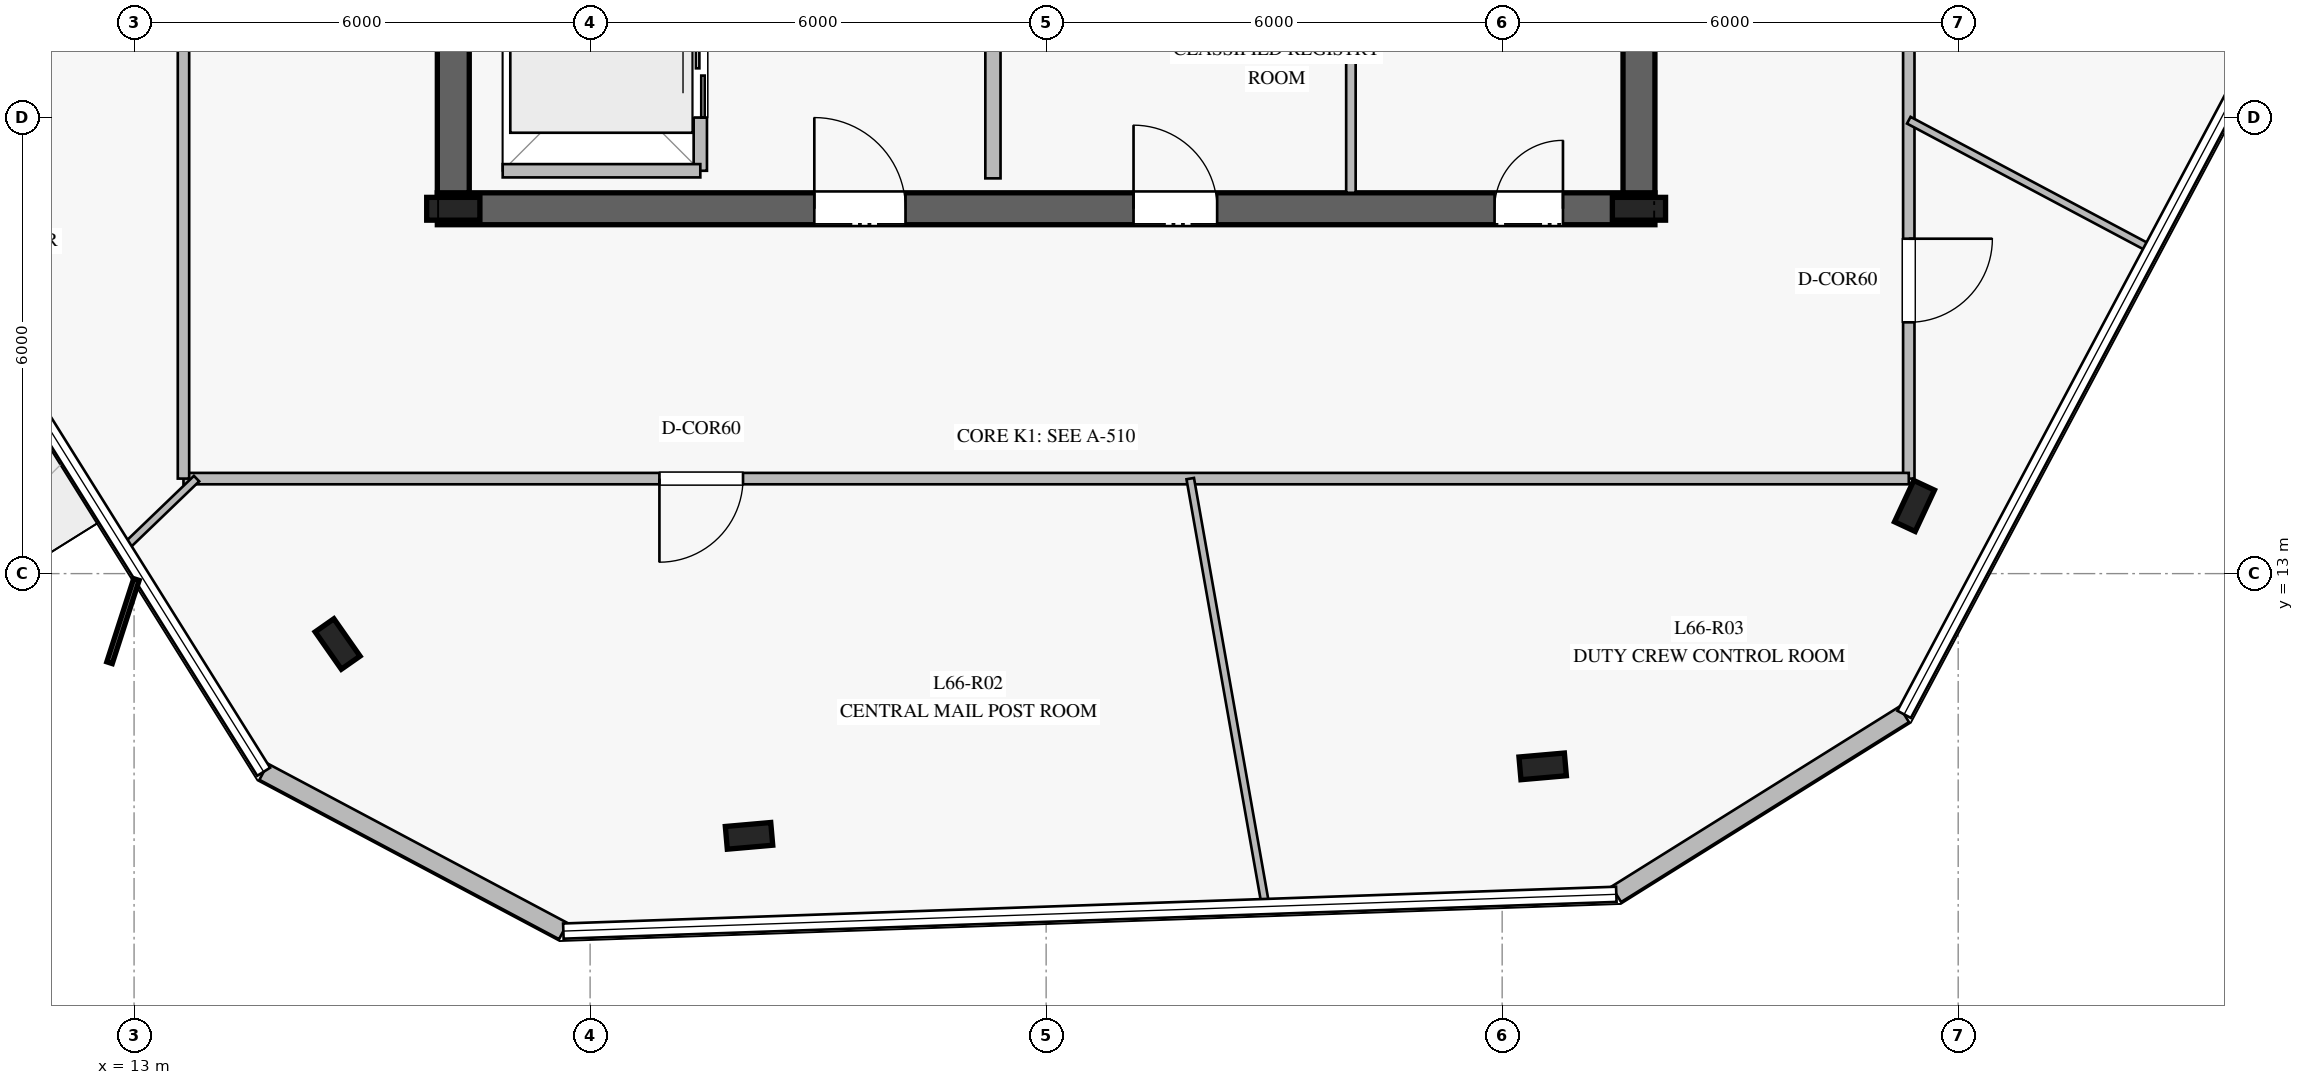
"""IFC4 building model, lengths in metres.
Left out: names, types, materials, properties, quantities, classifications, styles, units other than length and angle.
Written with IfcOpenShell. Run it as: python <this file> out.ifc"""

import sys

from ifc_helpers import new_model, si_unit, direction, frame, frame_2d, origin, origin_2d, place, context, subcontext, project, spatial, rectangle, i_section, extrude, element, fill, save


model = new_model("IFC4")
c1 = context("Model", 3, precision=1e-05, world=origin(), true_north=direction((0.0, 1.0)))
c2 = subcontext(c1, "Body", "Model", "MODEL_VIEW")
j1 = project(units=[si_unit("LENGTHUNIT", "METRE"), si_unit("PLANEANGLEUNIT", "RADIAN")], contexts=[c1])
p1 = place(None, origin())
s1 = spatial("IfcSite", under=j1, at=p1, CompositionType="ELEMENT")
p2 = place(p1, origin())
s2 = spatial("IfcBuilding", under=s1, at=p2, CompositionType="ELEMENT")
p3 = place(p2, frame((0.0, 0.0, 274.2)))
s3 = spatial("IfcBuildingStorey", under=s2, at=p3, CompositionType="ELEMENT", Elevation=274.2)
p4 = place(p3, frame((16.99, 17.8, 0.0), z_axis=(0.0, 0.0, 1.0), x_axis=(1.0, 0.0, 0.0)))
e1 = element("IfcWall", 1, at=p4, inside=s3, PredefinedType="SHEAR", context=c2, shape_type="SweptSolid", body=[
    extrude(rectangle(XDim=16.02, YDim=0.42, at=frame_2d((8.01, 0.0))), origin(), (0.0, 0.0, 1.0), 3.78),
])
p5 = place(p4, frame((4.96, 0.0, 0.0)))
e2 = element("IfcOpeningElement", 2, at=p5, cuts=e1, PredefinedType="OPENING", context=c2, shape_type="SweptSolid", body=[
    extrude(rectangle(XDim=1.2, YDim=2.25, at=frame_2d((0.6, 1.125))), frame((0.0, 0.22, 0.0), z_axis=(0.0, -1.0, 0.0), x_axis=(1.0, 0.0, 0.0)), (0.0, 0.0, 1.0), 0.44),
])
p6 = place(p4, frame((13.91, 0.0, 0.0)))
e3 = element("IfcOpeningElement", 3, at=p6, cuts=e1, PredefinedType="OPENING", context=c2, shape_type="SweptSolid", body=[
    extrude(rectangle(XDim=0.9, YDim=2.1, at=frame_2d((0.45, 1.05))), frame((0.0, 0.22, 0.0), z_axis=(0.0, -1.0, 0.0), x_axis=(1.0, 0.0, 0.0)), (0.0, 0.0, 1.0), 0.44),
])
p7 = place(p4, frame((9.16, 0.0, 0.0)))
e4 = element("IfcOpeningElement", 4, at=p7, cuts=e1, PredefinedType="OPENING", context=c2, shape_type="SweptSolid", body=[
    extrude(rectangle(XDim=1.1, YDim=2.2, at=frame_2d((0.55, 1.1))), frame((0.0, 0.22, 0.0), z_axis=(0.0, -1.0, 0.0), x_axis=(1.0, 0.0, 0.0)), (0.0, 0.0, 1.0), 0.44),
])
p8 = place(p3, frame((17.2, 31.99, 0.0), z_axis=(0.0, 0.0, 1.0), x_axis=(0.0, -1.0, 0.0)))
e5 = element("IfcWall", 5, at=p8, inside=s3, PredefinedType="SHEAR", context=c2, shape_type="SweptSolid", body=[
    extrude(rectangle(XDim=13.98, YDim=0.42, at=frame_2d((6.99, 0.0))), origin(), (0.0, 0.0, 1.0), 3.78),
])
p9 = place(p8, frame((2.14, 0.0, 0.0)))
e6 = element("IfcOpeningElement", 6, at=p9, cuts=e5, PredefinedType="OPENING", context=c2, shape_type="SweptSolid", body=[
    extrude(rectangle(XDim=1.5, YDim=2.2, at=frame_2d((0.75, 1.1))), frame((0.0, 0.22, 0.0), z_axis=(0.0, -1.0, 0.0), x_axis=(1.0, 0.0, 0.0)), (0.0, 0.0, 1.0), 0.44),
])
p10 = place(p3, frame((32.8, 18.01, 0.0), z_axis=(0.0, 0.0, 1.0), x_axis=(0.0, 1.0, 0.0)))
e7 = element("IfcWall", 7, at=p10, inside=s3, PredefinedType="SHEAR", context=c2, shape_type="SweptSolid", body=[
    extrude(rectangle(XDim=13.98, YDim=0.42, at=frame_2d((6.99, 0.0))), origin(), (0.0, 0.0, 1.0), 3.78),
])
for number, where, z_axis, x_axis in (
    (8, (17.2, 17.8, 0.0), (0.0, 0.0, 1.0), (1.0, 0.0, 0.0)),
    (9, (32.8, 17.8, 0.0), (0.0, 0.0, 1.0), (1.0, 0.0, 0.0)),
):
    element("IfcColumn", number, at=place(p3, frame(where, z_axis=z_axis, x_axis=x_axis)), inside=s3, PredefinedType="COLUMN", context=c2, shape_type="SweptSolid", body=[
        extrude(i_section(OverallWidth=0.3, OverallDepth=0.7, WebThickness=0.017, FlangeThickness=0.032, at=origin_2d()), origin(), (0.0, 0.0, 1.0), 4.0),
    ])
for number, where, z_axis, x_axis in (
    (10, (15.678, 12.074, 0.0), (0.0, 0.0, 1.0), (-0.574, 0.819, 0.0)),
    (11, (21.091, 9.55, 0.0), (0.0, 0.0, 1.0), (0.996, 0.087, 0.0)),
    (12, (31.533, 10.464, 0.0), (0.0, 0.0, 1.0), (0.996, 0.087, 0.0)),
    (13, (36.425, 13.89, 0.0), (0.0, 0.0, 1.0), (0.423, 0.906, 0.0)),
):
    element("IfcColumn", number, at=place(p3, frame(where, z_axis=z_axis, x_axis=x_axis)), inside=s3, PredefinedType="COLUMN", context=c2, shape_type="SweptSolid", body=[
        extrude(i_section(OverallWidth=0.3, OverallDepth=0.6, WebThickness=0.015, FlangeThickness=0.03, at=origin_2d()), origin(), (0.0, 0.0, 1.0), 4.0),
    ])
p11 = place(p3, frame((14.705, 10.393, 0.0), z_axis=(0.0, 0.0, 1.0), x_axis=(0.882995347911, -0.469381737574, 0.0)))
e14 = element("IfcWall", 14, at=p11, inside=s3, PredefinedType="STANDARD", context=c2, shape_type="SweptSolid", body=[
    extrude(rectangle(XDim=4.465, YDim=0.24, at=frame_2d((2.233, 0.0))), origin(), (0.0, 0.0, 1.0), 3.78),
])
p12 = place(p3, frame((32.502, 8.781, 0.0), z_axis=(0.0, 0.0, 1.0), x_axis=(0.847998304005, 0.529998940003, 0.0)))
e15 = element("IfcWall", 15, at=p12, inside=s3, PredefinedType="STANDARD", context=c2, shape_type="SweptSolid", body=[
    extrude(rectangle(XDim=4.466, YDim=0.24, at=frame_2d((2.233, 0.0))), origin(), (0.0, 0.0, 1.0), 3.78),
])
p13 = place(p3, frame((24.3, 18.2, 0.0), z_axis=(0.0, 0.0, 1.0), x_axis=(0.0, 1.0, 0.0)))
e16 = element("IfcWall", 16, at=p13, inside=s3, PredefinedType="PARTITIONING", context=c2, shape_type="SweptSolid", body=[
    extrude(rectangle(XDim=5.15, YDim=0.2, at=frame_2d((2.575, 0.0))), origin(), (0.0, 0.0, 1.0), 3.78),
])
p14 = place(p3, frame((29.01, 18.01, 0.0), z_axis=(0.0, 0.0, 1.0), x_axis=(0.0, 1.0, 0.0)))
e17 = element("IfcWall", 17, at=p14, inside=s3, PredefinedType="PARTITIONING", context=c2, shape_type="SweptSolid", body=[
    extrude(rectangle(XDim=2.54, YDim=0.125, at=frame_2d((1.27, 0.0))), origin(), (0.0, 0.0, 1.0), 3.78),
])
p15 = place(p3, frame((20.45, 18.3, 0.0), z_axis=(0.0, 0.0, 1.0), x_axis=(0.0, 1.0, 0.0)))
e18 = element("IfcWall", 18, at=p15, inside=s3, PredefinedType="PARTITIONING", context=c2, shape_type="SweptSolid", body=[
    extrude(rectangle(XDim=2.6, YDim=0.175, at=frame_2d((1.3, 0.0))), origin(), (0.0, 0.0, 1.0), 3.78),
])
p16 = place(p15, frame((0.7, 0.0, 0.0)))
e19 = element("IfcOpeningElement", 19, at=p16, cuts=e18, PredefinedType="OPENING", context=c2, shape_type="SweptSolid", body=[
    extrude(rectangle(XDim=1.2, YDim=2.2, at=frame_2d((0.6, 1.1))), frame((0.0, 0.098, 0.0), z_axis=(0.0, -1.0, 0.0), x_axis=(1.0, 0.0, 0.0)), (0.0, 0.0, 1.0), 0.195),
])
p17 = place(p3, frame((17.85, 18.3, 0.0), z_axis=(0.0, 0.0, 1.0), x_axis=(1.0, 0.0, 0.0)))
e20 = element("IfcWall", 20, at=p17, inside=s3, PredefinedType="PARTITIONING", context=c2, shape_type="SweptSolid", body=[
    extrude(rectangle(XDim=2.6, YDim=0.175, at=frame_2d((1.3, 0.0))), origin(), (0.0, 0.0, 1.0), 3.78),
])
p18 = place(p3, frame((36.35, 35.75, 0.0), z_axis=(0.0, 0.0, 1.0), x_axis=(0.0, -1.0, 0.0)))
e21 = element("IfcWall", 21, at=p18, inside=s3, PredefinedType="PARTITIONING", context=c2, shape_type="SweptSolid", body=[
    extrude(rectangle(XDim=21.5, YDim=0.15, at=frame_2d((10.75, 0.0))), origin(), (0.0, 0.0, 1.0), 3.28),
])
p19 = place(p18, frame((18.344, 0.0, 0.0)))
e22 = element("IfcOpeningElement", 22, at=p19, cuts=e21, PredefinedType="OPENING", context=c2, shape_type="SweptSolid", body=[
    extrude(rectangle(XDim=1.1, YDim=2.2, at=frame_2d((0.55, 1.1))), frame((0.0, 0.085, 0.0), z_axis=(0.0, -1.0, 0.0), x_axis=(1.0, 0.0, 0.0)), (0.0, 0.0, 1.0), 0.17),
])
p20 = place(p18, frame((10.606, 0.0, 0.0)))
e23 = element("IfcOpeningElement", 23, at=p20, cuts=e21, PredefinedType="OPENING", context=c2, shape_type="SweptSolid", body=[
    extrude(rectangle(XDim=1.1, YDim=2.2, at=frame_2d((0.55, 1.1))), frame((0.0, 0.085, 0.0), z_axis=(0.0, -1.0, 0.0), x_axis=(1.0, 0.0, 0.0)), (0.0, 0.0, 1.0), 0.17),
])
p21 = place(p3, frame((36.35, 14.25, 0.0), z_axis=(0.0, 0.0, 1.0), x_axis=(-1.0, 0.0, 0.0)))
e24 = element("IfcWall", 24, at=p21, inside=s3, PredefinedType="PARTITIONING", context=c2, shape_type="SweptSolid", body=[
    extrude(rectangle(XDim=22.7, YDim=0.15, at=frame_2d((11.35, 0.0))), origin(), (0.0, 0.0, 1.0), 3.05),
])
p22 = place(p21, frame((15.338, 0.0, 0.0)))
e25 = element("IfcOpeningElement", 25, at=p22, cuts=e24, PredefinedType="OPENING", context=c2, shape_type="SweptSolid", body=[
    extrude(rectangle(XDim=1.1, YDim=2.2, at=frame_2d((0.55, 1.1))), frame((0.0, 0.085, 0.0), z_axis=(0.0, -1.0, 0.0), x_axis=(1.0, 0.0, 0.0)), (0.0, 0.0, 1.0), 0.17),
])
p23 = place(p3, frame((13.65, 14.25, 0.0), z_axis=(0.0, 0.0, 1.0), x_axis=(0.0, 1.0, 0.0)))
e26 = element("IfcWall", 26, at=p23, inside=s3, PredefinedType="PARTITIONING", context=c2, shape_type="SweptSolid", body=[
    extrude(rectangle(XDim=21.5, YDim=0.15, at=frame_2d((10.75, 0.0))), origin(), (0.0, 0.0, 1.0), 3.28),
])
p24 = place(p23, frame((6.568, 0.0, 0.0)))
e27 = element("IfcOpeningElement", 27, at=p24, cuts=e26, PredefinedType="OPENING", context=c2, shape_type="SweptSolid", body=[
    extrude(rectangle(XDim=1.1, YDim=2.2, at=frame_2d((0.55, 1.1))), frame((0.0, 0.085, 0.0), z_axis=(0.0, -1.0, 0.0), x_axis=(1.0, 0.0, 0.0)), (0.0, 0.0, 1.0), 0.17),
])
p25 = place(p3, frame((13.822, 14.25, 0.0), z_axis=(0.0, 0.0, 1.0), x_axis=(-0.720793582425, -0.693149775687, 0.0)))
e28 = element("IfcWall", 28, at=p25, inside=s3, PredefinedType="MOVABLE", context=c2, shape_type="SweptSolid", body=[
    extrude(rectangle(XDim=1.307, YDim=0.1, at=frame_2d((0.654, 0.0))), origin(), (0.0, 0.0, 1.0), 3.28),
])
p26 = place(p3, frame((26.896, 14.25, 0.0), z_axis=(0.0, 0.0, 1.0), x_axis=(0.17366317524, -0.984805108418, 0.0)))
e29 = element("IfcWall", 29, at=p26, inside=s3, PredefinedType="MOVABLE", context=c2, shape_type="SweptSolid", body=[
    extrude(rectangle(XDim=5.701, YDim=0.1, at=frame_2d((2.85, 0.0))), origin(), (0.0, 0.0, 1.0), 3.05),
])
p27 = place(p3, frame((36.35, 18.965, 0.0), z_axis=(0.0, 0.0, 1.0), x_axis=(0.882958513107, -0.46945102421, 0.0)))
e30 = element("IfcWall", 30, at=p27, inside=s3, PredefinedType="MOVABLE", context=c2, shape_type="SweptSolid", body=[
    extrude(rectangle(XDim=3.6, YDim=0.1, at=frame_2d((1.8, 0.0))), origin(), (0.0, 0.0, 1.0), 3.28),
])
p28 = place(p5, origin())
e31 = element("IfcDoor", 31, at=p28, inside=s3, OperationType="SINGLE_SWING_LEFT", PredefinedType="DOOR", context=c2, shape_type="SweptSolid", body=[
    extrude(rectangle(XDim=1.2, YDim=2.25, at=frame_2d((0.6, 1.125))), frame((0.0, 0.025, 0.0), z_axis=(0.0, -1.0, 0.0), x_axis=(1.0, 0.0, 0.0)), (0.0, 0.0, 1.0), 0.05),
])
fill(e2, e31)
p29 = place(p6, origin())
e32 = element("IfcDoor", 32, at=p29, inside=s3, OperationType="SINGLE_SWING_RIGHT", PredefinedType="DOOR", context=c2, shape_type="SweptSolid", body=[
    extrude(rectangle(XDim=0.9, YDim=2.1, at=frame_2d((0.45, 1.05))), frame((0.0, 0.025, 0.0), z_axis=(0.0, -1.0, 0.0), x_axis=(1.0, 0.0, 0.0)), (0.0, 0.0, 1.0), 0.05),
])
fill(e3, e32)
p30 = place(p7, origin())
e33 = element("IfcDoor", 33, at=p30, inside=s3, OperationType="SINGLE_SWING_LEFT", PredefinedType="DOOR", context=c2, shape_type="SweptSolid", body=[
    extrude(rectangle(XDim=1.1, YDim=2.2, at=frame_2d((0.55, 1.1))), frame((0.0, 0.025, 0.0), z_axis=(0.0, -1.0, 0.0), x_axis=(1.0, 0.0, 0.0)), (0.0, 0.0, 1.0), 0.05),
])
fill(e4, e33)
p31 = place(p16, origin())
e34 = element("IfcDoor", 34, at=p31, inside=s3, OperationType="DOUBLE_DOOR_SLIDING", PredefinedType="DOOR", context=c2, shape_type="SweptSolid", body=[
    extrude(rectangle(XDim=1.2, YDim=2.2, at=frame_2d((0.6, 1.1))), frame((0.0, 0.025, 0.0), z_axis=(0.0, -1.0, 0.0), x_axis=(1.0, 0.0, 0.0)), (0.0, 0.0, 1.0), 0.05),
])
fill(e19, e34)
p32 = place(p22, origin())
e35 = element("IfcDoor", 35, at=p32, inside=s3, OperationType="SINGLE_SWING_RIGHT", PredefinedType="DOOR", context=c2, shape_type="SweptSolid", body=[
    extrude(rectangle(XDim=1.1, YDim=2.2, at=frame_2d((0.55, 1.1))), frame((0.0, 0.025, 0.0), z_axis=(0.0, -1.0, 0.0), x_axis=(1.0, 0.0, 0.0)), (0.0, 0.0, 1.0), 0.05),
])
fill(e25, e35)
p33 = place(p19, origin())
e36 = element("IfcDoor", 36, at=p33, inside=s3, OperationType="SINGLE_SWING_LEFT", PredefinedType="DOOR", context=c2, shape_type="SweptSolid", body=[
    extrude(rectangle(XDim=1.1, YDim=2.2, at=frame_2d((0.55, 1.1))), frame((0.0, 0.025, 0.0), z_axis=(0.0, -1.0, 0.0), x_axis=(1.0, 0.0, 0.0)), (0.0, 0.0, 1.0), 0.05),
])
fill(e22, e36)
save(model, sys.argv[1])
